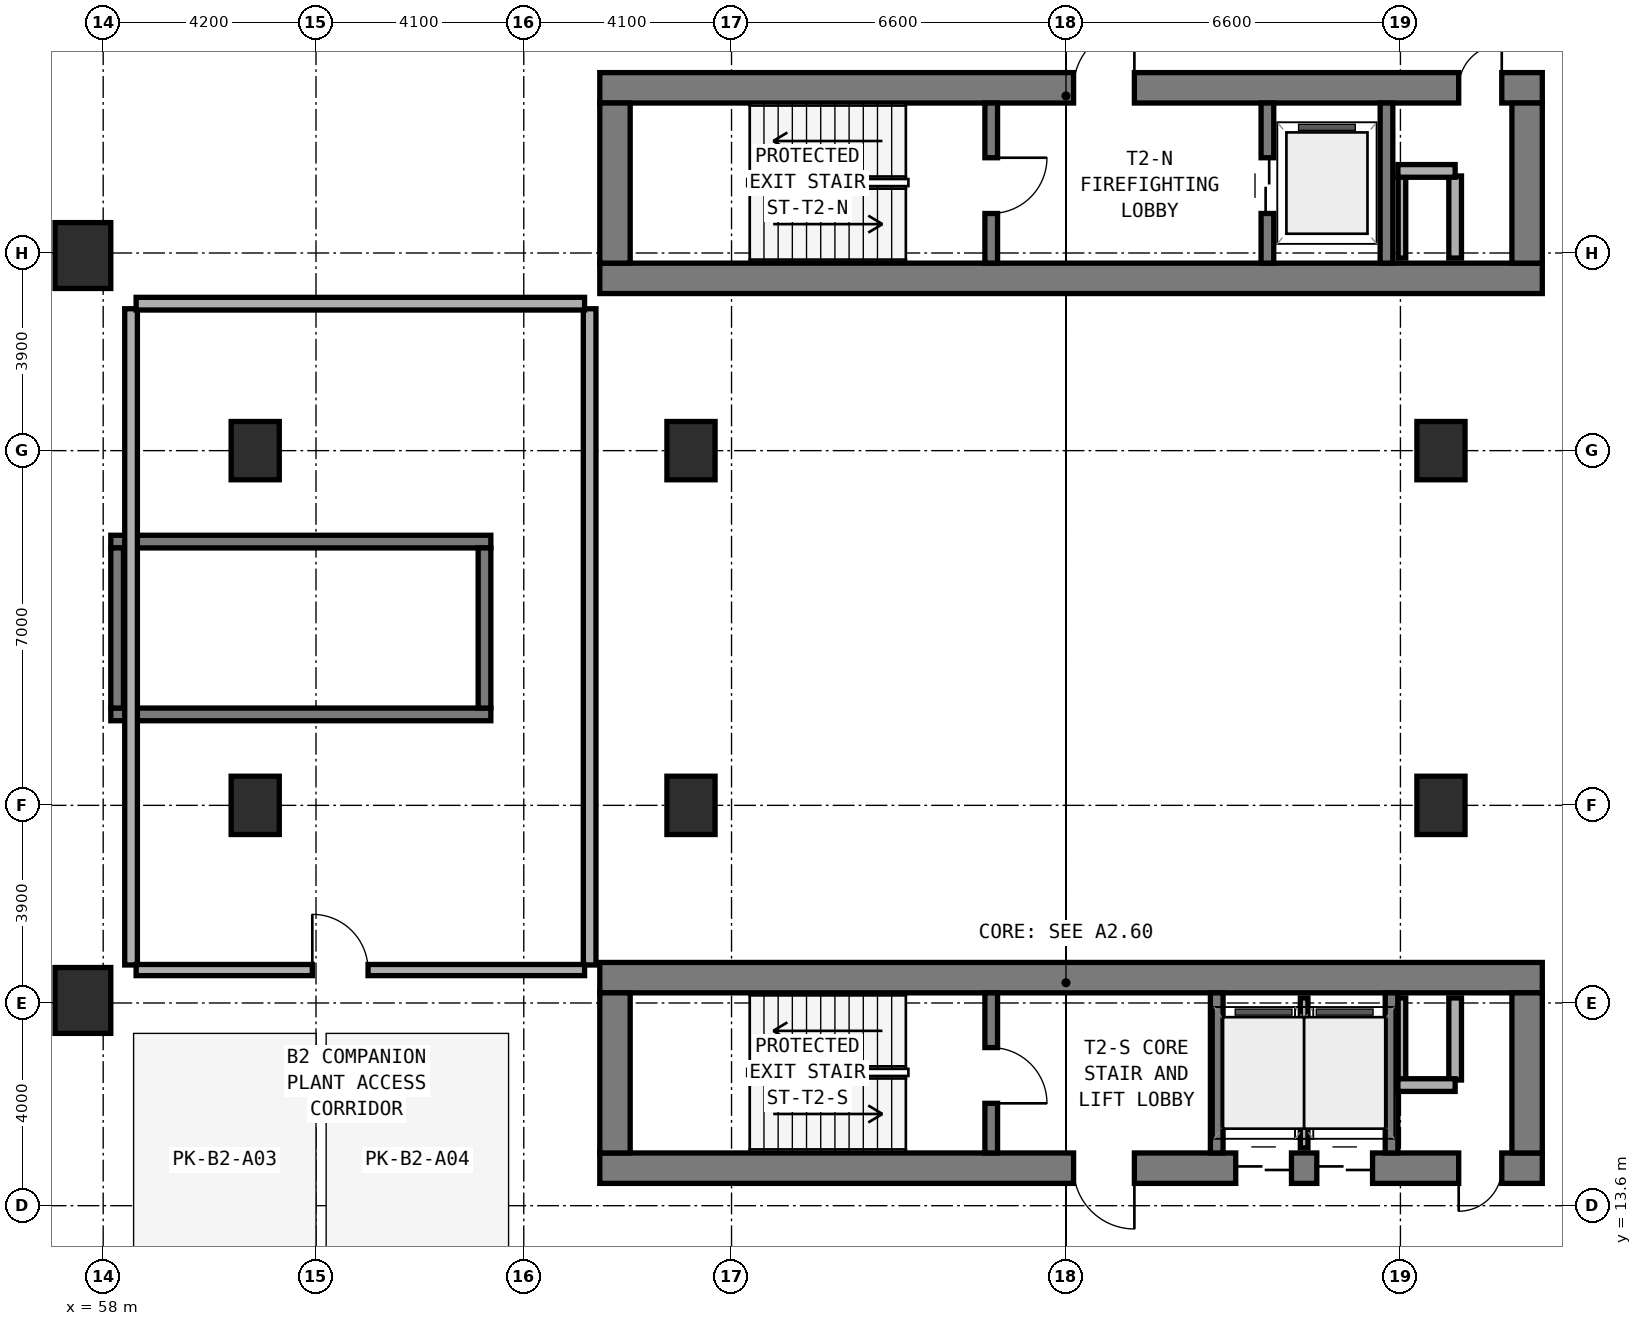
"""IFC4 building model, lengths in metres.
Left out: names, types, materials, properties, quantities, classifications, styles, units other than length and angle.
Written with IfcOpenShell. Run it as: python <this file> out.ifc"""

import sys

from ifc_helpers import new_model, si_unit, direction, frame, frame_2d, origin, origin_2d, place, context, subcontext, project, spatial, rectangle, extrude, element, fill, save


model = new_model("IFC4")
c1 = context("Model", 3, precision=1e-05, world=origin(), true_north=direction((0.0, 1.0)))
c2 = subcontext(c1, "Body", "Model", "MODEL_VIEW")
j1 = project(units=[si_unit("LENGTHUNIT", "METRE"), si_unit("PLANEANGLEUNIT", "RADIAN")], contexts=[c1])
p1 = place(None, origin())
s1 = spatial("IfcSite", under=j1, at=p1, CompositionType="ELEMENT")
p2 = place(p1, origin())
s2 = spatial("IfcBuilding", under=s1, at=p2, CompositionType="ELEMENT")
p3 = place(p2, frame((0.0, 0.0, -8.4)))
s3 = spatial("IfcBuildingStorey", under=s2, at=p3, CompositionType="ELEMENT", Elevation=-8.4)
p4 = place(p3, frame((67.8, 31.9, 0.0), z_axis=(0.0, 0.0, 1.0), x_axis=(1.0, 0.0, 0.0)))
e1 = element("IfcWall", 1, at=p4, inside=s3, PredefinedType="SHEAR", context=c2, shape_type="SweptSolid", body=[
    extrude(rectangle(XDim=18.6, YDim=0.6, at=frame_2d((9.3, 0.0))), origin(), (0.0, 0.0, 1.0), 4.2),
])
p5 = place(p3, frame((67.8, 35.66, 0.0), z_axis=(0.0, 0.0, 1.0), x_axis=(1.0, 0.0, 0.0)))
e2 = element("IfcWall", 2, at=p5, inside=s3, PredefinedType="SHEAR", context=c2, shape_type="SweptSolid", body=[
    extrude(rectangle(XDim=18.6, YDim=0.6, at=frame_2d((9.3, 0.0))), origin(), (0.0, 0.0, 1.0), 4.2),
])
p6 = place(p5, frame((9.35, 0.0, 0.0)))
e3 = element("IfcOpeningElement", 3, at=p6, cuts=e2, PredefinedType="OPENING", context=c2, shape_type="SweptSolid", body=[
    extrude(rectangle(XDim=1.2, YDim=2.15, at=frame_2d((0.6, 1.075))), frame((0.0, 0.31, 0.0), z_axis=(0.0, -1.0, 0.0), x_axis=(1.0, 0.0, 0.0)), (0.0, 0.0, 1.0), 0.62),
])
p7 = place(p5, frame((16.95, 0.0, 0.0)))
e4 = element("IfcOpeningElement", 4, at=p7, cuts=e2, PredefinedType="OPENING", context=c2, shape_type="SweptSolid", body=[
    extrude(rectangle(XDim=0.85, YDim=2.1, at=frame_2d((0.425, 1.05))), frame((0.0, 0.31, 0.0), z_axis=(0.0, -1.0, 0.0), x_axis=(1.0, 0.0, 0.0)), (0.0, 0.0, 1.0), 0.62),
])
for number, where, z_axis, x_axis in (
    (5, (68.1, 32.2, 0.0), (0.0, 0.0, 1.0), (0.0, 1.0, 0.0)),
    (6, (86.1, 32.2, 0.0), (0.0, 0.0, 1.0), (0.0, 1.0, 0.0)),
):
    element("IfcWall", number, at=place(p3, frame(where, z_axis=z_axis, x_axis=x_axis)), inside=s3, PredefinedType="SHEAR", context=c2, shape_type="SweptSolid", body=[
        extrude(rectangle(XDim=3.16, YDim=0.6, at=frame_2d((1.58, 0.0))), origin(), (0.0, 0.0, 1.0), 4.2),
    ])
p8 = place(p3, frame((75.525, 32.2, 0.0), z_axis=(0.0, 0.0, 1.0), x_axis=(0.0, 1.0, 0.0)))
e7 = element("IfcWall", 7, at=p8, inside=s3, PredefinedType="STANDARD", context=c2, shape_type="SweptSolid", body=[
    extrude(rectangle(XDim=3.16, YDim=0.25, at=frame_2d((1.58, 0.0))), origin(), (0.0, 0.0, 1.0), 3.88),
])
p9 = place(p8, frame((0.98, 0.0, 0.0)))
e8 = element("IfcOpeningElement", 8, at=p9, cuts=e7, PredefinedType="OPENING", context=c2, shape_type="SweptSolid", body=[
    extrude(rectangle(XDim=1.1, YDim=2.15, at=frame_2d((0.55, 1.075))), frame((0.0, 0.135, 0.0), z_axis=(0.0, -1.0, 0.0), x_axis=(1.0, 0.0, 0.0)), (0.0, 0.0, 1.0), 0.27),
])
p10 = place(p3, frame((80.975, 32.2, 0.0), z_axis=(0.0, 0.0, 1.0), x_axis=(0.0, 1.0, 0.0)))
e9 = element("IfcWall", 9, at=p10, inside=s3, PredefinedType="STANDARD", context=c2, shape_type="SweptSolid", body=[
    extrude(rectangle(XDim=3.16, YDim=0.25, at=frame_2d((1.58, 0.0))), origin(), (0.0, 0.0, 1.0), 3.88),
])
p11 = place(p10, frame((0.98, 0.0, 0.0)))
e10 = element("IfcOpeningElement", 10, at=p11, cuts=e9, PredefinedType="OPENING", context=c2, shape_type="SweptSolid", body=[
    extrude(rectangle(XDim=1.1, YDim=2.15, at=frame_2d((0.55, 1.075))), frame((0.0, 0.135, 0.0), z_axis=(0.0, -1.0, 0.0), x_axis=(1.0, 0.0, 0.0)), (0.0, 0.0, 1.0), 0.27),
])
p12 = place(p3, frame((83.325, 32.2, 0.0), z_axis=(0.0, 0.0, 1.0), x_axis=(0.0, 1.0, 0.0)))
e11 = element("IfcWall", 11, at=p12, inside=s3, PredefinedType="STANDARD", context=c2, shape_type="SweptSolid", body=[
    extrude(rectangle(XDim=3.16, YDim=0.25, at=frame_2d((1.58, 0.0))), origin(), (0.0, 0.0, 1.0), 3.88),
])
p13 = place(p3, frame((67.8, 14.34, 0.0), z_axis=(0.0, 0.0, 1.0), x_axis=(1.0, 0.0, 0.0)))
e12 = element("IfcWall", 12, at=p13, inside=s3, PredefinedType="SHEAR", context=c2, shape_type="SweptSolid", body=[
    extrude(rectangle(XDim=18.6, YDim=0.6, at=frame_2d((9.3, 0.0))), origin(), (0.0, 0.0, 1.0), 4.2),
])
p14 = place(p13, frame((9.35, 0.0, 0.0)))
e13 = element("IfcOpeningElement", 13, at=p14, cuts=e12, PredefinedType="OPENING", context=c2, shape_type="SweptSolid", body=[
    extrude(rectangle(XDim=1.2, YDim=2.15, at=frame_2d((0.6, 1.075))), frame((0.0, 0.31, 0.0), z_axis=(0.0, -1.0, 0.0), x_axis=(1.0, 0.0, 0.0)), (0.0, 0.0, 1.0), 0.62),
])
p15 = place(p13, frame((16.95, 0.0, 0.0)))
e14 = element("IfcOpeningElement", 14, at=p15, cuts=e12, PredefinedType="OPENING", context=c2, shape_type="SweptSolid", body=[
    extrude(rectangle(XDim=0.85, YDim=2.1, at=frame_2d((0.425, 1.05))), frame((0.0, 0.31, 0.0), z_axis=(0.0, -1.0, 0.0), x_axis=(1.0, 0.0, 0.0)), (0.0, 0.0, 1.0), 0.62),
])
p16 = place(p13, frame((12.55, 0.0, 0.0)))
e15 = element("IfcOpeningElement", 15, at=p16, cuts=e12, PredefinedType="OPENING", context=c2, shape_type="SweptSolid", body=[
    extrude(rectangle(XDim=1.1, YDim=2.15, at=frame_2d((0.55, 1.075))), frame((0.0, 0.31, 0.0), z_axis=(0.0, -1.0, 0.0), x_axis=(1.0, 0.0, 0.0)), (0.0, 0.0, 1.0), 0.62),
])
p17 = place(p13, frame((14.15, 0.0, 0.0)))
e16 = element("IfcOpeningElement", 16, at=p17, cuts=e12, PredefinedType="OPENING", context=c2, shape_type="SweptSolid", body=[
    extrude(rectangle(XDim=1.1, YDim=2.15, at=frame_2d((0.55, 1.075))), frame((0.0, 0.31, 0.0), z_axis=(0.0, -1.0, 0.0), x_axis=(1.0, 0.0, 0.0)), (0.0, 0.0, 1.0), 0.62),
])
p18 = place(p3, frame((67.8, 18.1, 0.0), z_axis=(0.0, 0.0, 1.0), x_axis=(1.0, 0.0, 0.0)))
e17 = element("IfcWall", 17, at=p18, inside=s3, PredefinedType="SHEAR", context=c2, shape_type="SweptSolid", body=[
    extrude(rectangle(XDim=18.6, YDim=0.6, at=frame_2d((9.3, 0.0))), origin(), (0.0, 0.0, 1.0), 4.2),
])
for number, where, z_axis, x_axis in (
    (18, (68.1, 14.64, 0.0), (0.0, 0.0, 1.0), (0.0, 1.0, 0.0)),
    (19, (86.1, 14.64, 0.0), (0.0, 0.0, 1.0), (0.0, 1.0, 0.0)),
):
    element("IfcWall", number, at=place(p3, frame(where, z_axis=z_axis, x_axis=x_axis)), inside=s3, PredefinedType="SHEAR", context=c2, shape_type="SweptSolid", body=[
        extrude(rectangle(XDim=3.16, YDim=0.6, at=frame_2d((1.58, 0.0))), origin(), (0.0, 0.0, 1.0), 4.2),
    ])
p19 = place(p3, frame((75.525, 14.64, 0.0), z_axis=(0.0, 0.0, 1.0), x_axis=(0.0, 1.0, 0.0)))
e20 = element("IfcWall", 20, at=p19, inside=s3, PredefinedType="STANDARD", context=c2, shape_type="SweptSolid", body=[
    extrude(rectangle(XDim=3.16, YDim=0.25, at=frame_2d((1.58, 0.0))), origin(), (0.0, 0.0, 1.0), 3.88),
])
p20 = place(p19, frame((0.98, 0.0, 0.0)))
e21 = element("IfcOpeningElement", 21, at=p20, cuts=e20, PredefinedType="OPENING", context=c2, shape_type="SweptSolid", body=[
    extrude(rectangle(XDim=1.1, YDim=2.15, at=frame_2d((0.55, 1.075))), frame((0.0, 0.135, 0.0), z_axis=(0.0, -1.0, 0.0), x_axis=(1.0, 0.0, 0.0)), (0.0, 0.0, 1.0), 0.27),
])
for number, where, z_axis, x_axis in (
    (22, (79.975, 14.64, 0.0), (0.0, 0.0, 1.0), (0.0, 1.0, 0.0)),
    (23, (83.425, 14.64, 0.0), (0.0, 0.0, 1.0), (0.0, 1.0, 0.0)),
):
    element("IfcWall", number, at=place(p3, frame(where, z_axis=z_axis, x_axis=x_axis)), inside=s3, PredefinedType="STANDARD", context=c2, shape_type="SweptSolid", body=[
        extrude(rectangle(XDim=3.16, YDim=0.25, at=frame_2d((1.58, 0.0))), origin(), (0.0, 0.0, 1.0), 3.88),
    ])
for number, where, z_axis, x_axis in (
    (24, (58.15, 23.295, 0.0), (0.0, 0.0, 1.0), (1.0, 0.0, 0.0)),
    (25, (58.15, 26.705, 0.0), (0.0, 0.0, 1.0), (1.0, 0.0, 0.0)),
):
    element("IfcWall", number, at=place(p3, frame(where, z_axis=z_axis, x_axis=x_axis)), inside=s3, PredefinedType="STANDARD", context=c2, shape_type="SweptSolid", body=[
        extrude(rectangle(XDim=7.5, YDim=0.25, at=frame_2d((3.75, 0.0))), origin(), (0.0, 0.0, 1.0), 4.2),
    ])
for number, where, z_axis, x_axis in (
    (26, (58.275, 23.42, 0.0), (0.0, 0.0, 1.0), (0.0, 1.0, 0.0)),
    (27, (65.525, 23.42, 0.0), (0.0, 0.0, 1.0), (0.0, 1.0, 0.0)),
):
    element("IfcWall", number, at=place(p3, frame(where, z_axis=z_axis, x_axis=x_axis)), inside=s3, PredefinedType="STANDARD", context=c2, shape_type="SweptSolid", body=[
        extrude(rectangle(XDim=3.16, YDim=0.25, at=frame_2d((1.58, 0.0))), origin(), (0.0, 0.0, 1.0), 4.2),
    ])
for number, where, z_axis, x_axis in (
    (28, (61.0, 21.5, 0.0), (0.0, 0.0, 1.0), (1.0, 0.0, 0.0)),
    (29, (61.0, 28.5, 0.0), (0.0, 0.0, 1.0), (1.0, 0.0, 0.0)),
    (30, (69.6, 21.5, 0.0), (0.0, 0.0, 1.0), (1.0, 0.0, 0.0)),
    (31, (69.6, 28.5, 0.0), (0.0, 0.0, 1.0), (1.0, 0.0, 0.0)),
    (32, (84.4, 21.5, 0.0), (0.0, 0.0, 1.0), (1.0, 0.0, 0.0)),
    (33, (84.4, 28.5, 0.0), (0.0, 0.0, 1.0), (1.0, 0.0, 0.0)),
):
    element("IfcColumn", number, at=place(p3, frame(where, z_axis=z_axis, x_axis=x_axis)), inside=s3, PredefinedType="COLUMN", context=c2, shape_type="SweptSolid", body=[
        extrude(rectangle(XDim=0.95, YDim=1.15, at=origin_2d()), origin(), (0.0, 0.0, 1.0), 4.2),
    ])
for number, where, z_axis, x_axis in (
    (34, (57.6, 17.65, 0.0), (0.0, 0.0, 1.0), (1.0, 0.0, 0.0)),
    (35, (57.6, 32.35, 0.0), (0.0, 0.0, 1.0), (1.0, 0.0, 0.0)),
):
    element("IfcColumn", number, at=place(p3, frame(where, z_axis=z_axis, x_axis=x_axis)), inside=s3, PredefinedType="COLUMN", context=c2, shape_type="SweptSolid", body=[
        extrude(rectangle(XDim=1.1, YDim=1.3, at=origin_2d()), origin(), (0.0, 0.0, 1.0), 4.2),
    ])
p21 = place(p3, frame((83.63, 32.3, 0.0), z_axis=(0.0, 0.0, 1.0), x_axis=(0.0, 1.0, 0.0)))
e36 = element("IfcWall", 36, at=p21, inside=s3, PredefinedType="PARTITIONING", context=c2, shape_type="SweptSolid", body=[
    extrude(rectangle(XDim=1.62, YDim=0.15, at=frame_2d((0.81, 0.0))), origin(), (0.0, 0.0, 1.0), 3.355),
])
p22 = place(p3, frame((84.68, 32.3, 0.0), z_axis=(0.0, 0.0, 1.0), x_axis=(0.0, 1.0, 0.0)))
e37 = element("IfcWall", 37, at=p22, inside=s3, PredefinedType="SOLIDWALL", context=c2, shape_type="SweptSolid", body=[
    extrude(rectangle(XDim=1.62, YDim=0.25, at=frame_2d((0.81, 0.0))), origin(), (0.0, 0.0, 1.0), 3.88),
])
p23 = place(p3, frame((83.55, 34.02, 0.0), z_axis=(0.0, 0.0, 1.0), x_axis=(1.0, 0.0, 0.0)))
e38 = element("IfcWall", 38, at=p23, inside=s3, PredefinedType="SOLIDWALL", context=c2, shape_type="SweptSolid", body=[
    extrude(rectangle(XDim=1.13, YDim=0.25, at=frame_2d((0.565, 0.0))), origin(), (0.0, 0.0, 1.0), 3.88),
])
p24 = place(p3, frame((83.63, 16.08, 0.0), z_axis=(0.0, 0.0, 1.0), x_axis=(0.0, 1.0, 0.0)))
e39 = element("IfcWall", 39, at=p24, inside=s3, PredefinedType="PARTITIONING", context=c2, shape_type="SweptSolid", body=[
    extrude(rectangle(XDim=1.62, YDim=0.15, at=frame_2d((0.81, 0.0))), origin(), (0.0, 0.0, 1.0), 3.355),
])
p25 = place(p3, frame((84.68, 16.08, 0.0), z_axis=(0.0, 0.0, 1.0), x_axis=(0.0, 1.0, 0.0)))
e40 = element("IfcWall", 40, at=p25, inside=s3, PredefinedType="SOLIDWALL", context=c2, shape_type="SweptSolid", body=[
    extrude(rectangle(XDim=1.62, YDim=0.25, at=frame_2d((0.81, 0.0))), origin(), (0.0, 0.0, 1.0), 3.88),
])
p26 = place(p3, frame((83.55, 15.98, 0.0), z_axis=(0.0, 0.0, 1.0), x_axis=(1.0, 0.0, 0.0)))
e41 = element("IfcWall", 41, at=p26, inside=s3, PredefinedType="SOLIDWALL", context=c2, shape_type="SweptSolid", body=[
    extrude(rectangle(XDim=1.13, YDim=0.25, at=frame_2d((0.565, 0.0))), origin(), (0.0, 0.0, 1.0), 3.88),
])
p27 = place(p3, frame((81.7, 14.74, 0.0), z_axis=(0.0, 0.0, 1.0), x_axis=(0.0, 1.0, 0.0)))
e42 = element("IfcWall", 42, at=p27, inside=s3, PredefinedType="PARTITIONING", context=c2, shape_type="SweptSolid", body=[
    extrude(rectangle(XDim=2.96, YDim=0.15, at=frame_2d((1.48, 0.0))), origin(), (0.0, 0.0, 1.0), 3.88),
])
p28 = place(p3, frame((58.55, 18.35, 0.0), z_axis=(0.0, 0.0, 1.0), x_axis=(0.0, 1.0, 0.0)))
e43 = element("IfcWall", 43, at=p28, inside=s3, PredefinedType="SOLIDWALL", context=c2, shape_type="SweptSolid", body=[
    extrude(rectangle(XDim=12.95, YDim=0.25, at=frame_2d((6.475, 0.0))), origin(), (0.0, 0.0, 1.0), 3.88),
])
p29 = place(p3, frame((67.6, 18.35, 0.0), z_axis=(0.0, 0.0, 1.0), x_axis=(0.0, 1.0, 0.0)))
e44 = element("IfcWall", 44, at=p29, inside=s3, PredefinedType="SOLIDWALL", context=c2, shape_type="SweptSolid", body=[
    extrude(rectangle(XDim=12.95, YDim=0.25, at=frame_2d((6.475, 0.0))), origin(), (0.0, 0.0, 1.0), 3.355),
])
p30 = place(p3, frame((58.65, 31.4, 0.0), z_axis=(0.0, 0.0, 1.0), x_axis=(1.0, 0.0, 0.0)))
e45 = element("IfcWall", 45, at=p30, inside=s3, PredefinedType="SOLIDWALL", context=c2, shape_type="SweptSolid", body=[
    extrude(rectangle(XDim=8.85, YDim=0.25, at=frame_2d((4.425, 0.0))), origin(), (0.0, 0.0, 1.0), 3.495),
])
p31 = place(p3, frame((58.65, 18.25, 0.0), z_axis=(0.0, 0.0, 1.0), x_axis=(1.0, 0.0, 0.0)))
e46 = element("IfcWall", 46, at=p31, inside=s3, PredefinedType="SOLIDWALL", context=c2, shape_type="SweptSolid", body=[
    extrude(rectangle(XDim=8.85, YDim=0.22, at=frame_2d((4.425, 0.0))), origin(), (0.0, 0.0, 1.0), 3.495),
])
p32 = place(p31, frame((3.477, 0.0, 0.0)))
e47 = element("IfcOpeningElement", 47, at=p32, cuts=e46, PredefinedType="OPENING", context=c2, shape_type="SweptSolid", body=[
    extrude(rectangle(XDim=1.1, YDim=2.1, at=frame_2d((0.55, 1.05))), frame((0.0, 0.12, 0.0), z_axis=(0.0, -1.0, 0.0), x_axis=(1.0, 0.0, 0.0)), (0.0, 0.0, 1.0), 0.24),
])
p33 = place(p9, frame((1.1, 0.0, 0.0), z_axis=(0.0, 0.0, 1.0), x_axis=(-1.0, 0.0, 0.0)))
e48 = element("IfcDoor", 48, at=p33, inside=s3, OperationType="SINGLE_SWING_LEFT", PredefinedType="DOOR", context=c2, shape_type="SweptSolid", body=[
    extrude(rectangle(XDim=1.1, YDim=2.15, at=frame_2d((0.55, 1.075))), frame((0.0, 0.025, 0.0), z_axis=(0.0, -1.0, 0.0), x_axis=(1.0, 0.0, 0.0)), (0.0, 0.0, 1.0), 0.05),
])
fill(e8, e48)
p34 = place(p6, origin())
e49 = element("IfcDoor", 49, at=p34, inside=s3, OperationType="SINGLE_SWING_RIGHT", PredefinedType="DOOR", context=c2, shape_type="SweptSolid", body=[
    extrude(rectangle(XDim=1.2, YDim=2.15, at=frame_2d((0.6, 1.075))), frame((0.0, 0.025, 0.0), z_axis=(0.0, -1.0, 0.0), x_axis=(1.0, 0.0, 0.0)), (0.0, 0.0, 1.0), 0.05),
])
fill(e3, e49)
p35 = place(p11, origin())
e50 = element("IfcDoor", 50, at=p35, inside=s3, OperationType="DOUBLE_DOOR_SLIDING", PredefinedType="DOOR", context=c2, shape_type="SweptSolid", body=[
    extrude(rectangle(XDim=1.1, YDim=2.15, at=frame_2d((0.55, 1.075))), frame((0.0, 0.025, 0.0), z_axis=(0.0, -1.0, 0.0), x_axis=(1.0, 0.0, 0.0)), (0.0, 0.0, 1.0), 0.05),
])
fill(e10, e50)
p36 = place(p7, origin())
e51 = element("IfcDoor", 51, at=p36, inside=s3, OperationType="SINGLE_SWING_RIGHT", PredefinedType="DOOR", context=c2, shape_type="SweptSolid", body=[
    extrude(rectangle(XDim=0.85, YDim=2.1, at=frame_2d((0.425, 1.05))), frame((0.0, 0.025, 0.0), z_axis=(0.0, -1.0, 0.0), x_axis=(1.0, 0.0, 0.0)), (0.0, 0.0, 1.0), 0.05),
])
fill(e4, e51)
p37 = place(p20, frame((1.1, 0.0, 0.0), z_axis=(0.0, 0.0, 1.0), x_axis=(-1.0, 0.0, 0.0)))
e52 = element("IfcDoor", 52, at=p37, inside=s3, OperationType="SINGLE_SWING_RIGHT", PredefinedType="DOOR", context=c2, shape_type="SweptSolid", body=[
    extrude(rectangle(XDim=1.1, YDim=2.15, at=frame_2d((0.55, 1.075))), frame((0.0, 0.025, 0.0), z_axis=(0.0, -1.0, 0.0), x_axis=(1.0, 0.0, 0.0)), (0.0, 0.0, 1.0), 0.05),
])
fill(e21, e52)
p38 = place(p14, frame((1.2, 0.0, 0.0), z_axis=(0.0, 0.0, 1.0), x_axis=(-1.0, 0.0, 0.0)))
e53 = element("IfcDoor", 53, at=p38, inside=s3, OperationType="SINGLE_SWING_LEFT", PredefinedType="DOOR", context=c2, shape_type="SweptSolid", body=[
    extrude(rectangle(XDim=1.2, YDim=2.15, at=frame_2d((0.6, 1.075))), frame((0.0, 0.025, 0.0), z_axis=(0.0, -1.0, 0.0), x_axis=(1.0, 0.0, 0.0)), (0.0, 0.0, 1.0), 0.05),
])
fill(e13, e53)
p39 = place(p15, frame((0.85, 0.0, 0.0), z_axis=(0.0, 0.0, 1.0), x_axis=(-1.0, 0.0, 0.0)))
e54 = element("IfcDoor", 54, at=p39, inside=s3, OperationType="SINGLE_SWING_RIGHT", PredefinedType="DOOR", context=c2, shape_type="SweptSolid", body=[
    extrude(rectangle(XDim=0.85, YDim=2.1, at=frame_2d((0.425, 1.05))), frame((0.0, 0.025, 0.0), z_axis=(0.0, -1.0, 0.0), x_axis=(1.0, 0.0, 0.0)), (0.0, 0.0, 1.0), 0.05),
])
fill(e14, e54)
p40 = place(p16, frame((1.1, 0.0, 0.0), z_axis=(0.0, 0.0, 1.0), x_axis=(-1.0, 0.0, 0.0)))
e55 = element("IfcDoor", 55, at=p40, inside=s3, OperationType="DOUBLE_DOOR_SLIDING", PredefinedType="DOOR", context=c2, shape_type="SweptSolid", body=[
    extrude(rectangle(XDim=1.1, YDim=2.15, at=frame_2d((0.55, 1.075))), frame((0.0, 0.025, 0.0), z_axis=(0.0, -1.0, 0.0), x_axis=(1.0, 0.0, 0.0)), (0.0, 0.0, 1.0), 0.05),
])
fill(e15, e55)
p41 = place(p17, frame((1.1, 0.0, 0.0), z_axis=(0.0, 0.0, 1.0), x_axis=(-1.0, 0.0, 0.0)))
e56 = element("IfcDoor", 56, at=p41, inside=s3, OperationType="DOUBLE_DOOR_SLIDING", PredefinedType="DOOR", context=c2, shape_type="SweptSolid", body=[
    extrude(rectangle(XDim=1.1, YDim=2.15, at=frame_2d((0.55, 1.075))), frame((0.0, 0.025, 0.0), z_axis=(0.0, -1.0, 0.0), x_axis=(1.0, 0.0, 0.0)), (0.0, 0.0, 1.0), 0.05),
])
fill(e16, e56)
p42 = place(p32, origin())
e57 = element("IfcDoor", 57, at=p42, inside=s3, OperationType="SINGLE_SWING_LEFT", PredefinedType="DOOR", context=c2, shape_type="SweptSolid", body=[
    extrude(rectangle(XDim=1.1, YDim=2.1, at=frame_2d((0.55, 1.05))), frame((0.0, 0.025, 0.0), z_axis=(0.0, -1.0, 0.0), x_axis=(1.0, 0.0, 0.0)), (0.0, 0.0, 1.0), 0.05),
])
fill(e47, e57)
save(model, sys.argv[1])
